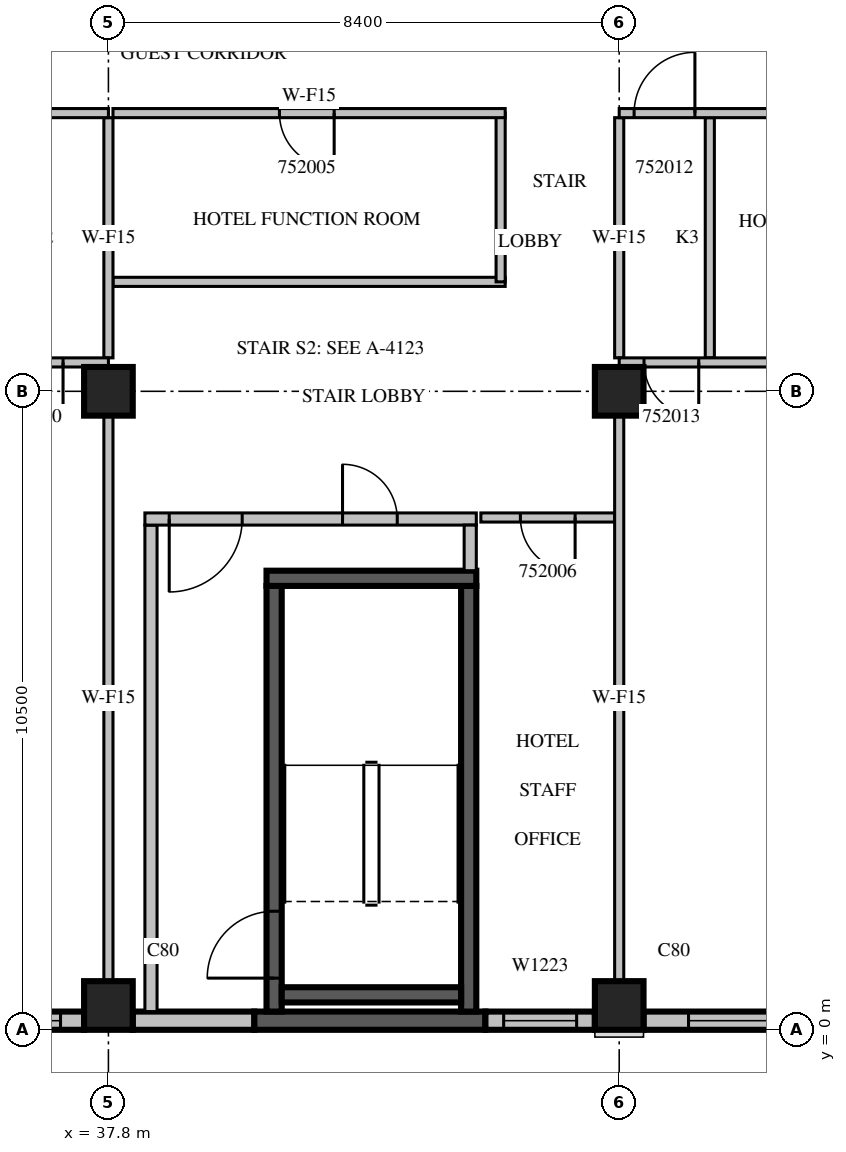
"""IFC4 building model, lengths in metres.
Left out: names, types, materials, properties, quantities, classifications, styles, units other than length and angle.
Written with IfcOpenShell. Run it as: python <this file> out.ifc"""

import sys

from ifc_helpers import new_model, si_unit, direction, frame, frame_2d, origin, origin_2d, place, context, subcontext, project, spatial, rectangle, extrude, source, transform, mapped, element, fill, save


model = new_model("IFC4")
c1 = context("Model", 3, precision=1e-05, world=origin(), true_north=direction((0.0, 1.0)))
c2 = subcontext(c1, "Body", "Model", "MODEL_VIEW")
j1 = project(units=[si_unit("LENGTHUNIT", "METRE"), si_unit("PLANEANGLEUNIT", "RADIAN")], contexts=[c1])
p1 = place(None, origin())
s1 = spatial("IfcSite", under=j1, at=p1, CompositionType="ELEMENT")
p2 = place(p1, origin())
s2 = spatial("IfcBuilding", under=s1, at=p2, CompositionType="ELEMENT")
p3 = place(p2, frame((0.0, 0.0, 231.0)))
s3 = spatial("IfcBuildingStorey", under=s2, at=p3, CompositionType="ELEMENT", Elevation=231.0)
m1 = source(origin(), c2, "Body", "SweptSolid", [
    extrude(rectangle(XDim=0.8, YDim=0.8, at=origin_2d()), origin(), (0.0, 0.0, 1.0), 3.8),
])
for number, where, z_axis, x_axis in (
    (1, (37.8, 0.4, 0.0), (0.0, 0.0, 1.0), (1.0, 0.0, 0.0)),
    (2, (46.2, 0.4, 0.0), (0.0, 0.0, 1.0), (1.0, 0.0, 0.0)),
    (3, (37.8, 10.5, 0.0), (0.0, 0.0, 1.0), (1.0, 0.0, 0.0)),
    (4, (46.2, 10.5, 0.0), (0.0, 0.0, 1.0), (1.0, 0.0, 0.0)),
):
    element("IfcColumn", number, at=place(p3, frame(where, z_axis=z_axis, x_axis=x_axis)), inside=s3, PredefinedType="COLUMN", context=c2, shape_type="MappedRepresentation", body=[
        mapped(m1, transform((0.0, 0.0, 0.0), scale=1.0)),
    ])
m2 = source(origin(), c2, "Body", "SweptSolid", [
    extrude(rectangle(XDim=7.6, YDim=0.3, at=frame_2d((3.8, 0.0))), origin(), (0.0, 0.0, 1.0), 3.4),
])
p4 = place(p3, frame((29.8, 0.15, 0.0), z_axis=(0.0, 0.0, 1.0), x_axis=(1.0, 0.0, 0.0)))
e5 = element("IfcWall", 5, at=p4, inside=s3, PredefinedType="STANDARD", context=c2, shape_type="MappedRepresentation", body=[
    mapped(m2, transform((0.0, 0.0, 0.0), scale=1.0)),
])
m3 = source(origin(), c2, "Body", "SweptSolid", [
    extrude(rectangle(XDim=1.2, YDim=2.3, at=frame_2d((0.6, 1.15))), frame((0.0, 0.16, 0.0), z_axis=(0.0, -1.0, 0.0), x_axis=(1.0, 0.0, 0.0)), (0.0, 0.0, 1.0), 0.32),
])
p5 = place(p4, frame((0.487, 0.0, 0.6)))
e6 = element("IfcOpeningElement", 6, at=p5, cuts=e5, PredefinedType="OPENING", context=c2, shape_type="MappedRepresentation", body=[
    mapped(m3, transform((0.0, 0.0, 0.0), scale=1.0)),
])
p6 = place(p4, frame((6.013, 0.0, 0.6)))
e7 = element("IfcOpeningElement", 7, at=p6, cuts=e5, PredefinedType="OPENING", context=c2, shape_type="MappedRepresentation", body=[
    mapped(m3, transform((0.0, 0.0, 0.0), scale=1.0)),
])
m4 = source(origin(), c2, "Body", "SweptSolid", [
    extrude(rectangle(XDim=2.4, YDim=2.3, at=frame_2d((1.2, 1.15))), frame((0.0, 0.16, 0.0), z_axis=(0.0, -1.0, 0.0), x_axis=(1.0, 0.0, 0.0)), (0.0, 0.0, 1.0), 0.32),
])
p7 = place(p4, frame((2.65, 0.0, 0.6)))
e8 = element("IfcOpeningElement", 8, at=p7, cuts=e5, PredefinedType="OPENING", context=c2, shape_type="MappedRepresentation", body=[
    mapped(m4, transform((0.0, 0.0, 0.0), scale=1.0)),
])
m5 = source(origin(), c2, "Body", "SweptSolid", [
    extrude(rectangle(XDim=2.0, YDim=0.3, at=frame_2d((1.0, 0.0))), origin(), (0.0, 0.0, 1.0), 3.4),
])
p8 = place(p3, frame((38.2, 0.15, 0.0), z_axis=(0.0, 0.0, 1.0), x_axis=(1.0, 0.0, 0.0)))
e9 = element("IfcWall", 9, at=p8, inside=s3, PredefinedType="STANDARD", context=c2, shape_type="MappedRepresentation", body=[
    mapped(m5, transform((0.0, 0.0, 0.0), scale=1.0)),
])
m6 = source(origin(), c2, "Body", "SweptSolid", [
    extrude(rectangle(XDim=3.8, YDim=0.3, at=frame_2d((1.9, 0.0))), origin(), (0.0, 0.0, 1.0), 3.4),
])
p9 = place(p3, frame((40.2, 0.15, 0.0), z_axis=(0.0, 0.0, 1.0), x_axis=(1.0, 0.0, 0.0)))
e10 = element("IfcWall", 10, at=p9, inside=s3, PredefinedType="SOLIDWALL", context=c2, shape_type="MappedRepresentation", body=[
    mapped(m6, transform((0.0, 0.0, 0.0), scale=1.0)),
])
m7 = source(origin(), c2, "Body", "SweptSolid", [
    extrude(rectangle(XDim=1.8, YDim=0.3, at=frame_2d((0.9, 0.0))), origin(), (0.0, 0.0, 1.0), 3.4),
])
p10 = place(p3, frame((44.0, 0.15, 0.0), z_axis=(0.0, 0.0, 1.0), x_axis=(1.0, 0.0, 0.0)))
e11 = element("IfcWall", 11, at=p10, inside=s3, PredefinedType="STANDARD", context=c2, shape_type="MappedRepresentation", body=[
    mapped(m7, transform((0.0, 0.0, 0.0), scale=1.0)),
])
p11 = place(p10, frame((0.3, 0.0, 0.6)))
e12 = element("IfcOpeningElement", 12, at=p11, cuts=e11, PredefinedType="OPENING", context=c2, shape_type="MappedRepresentation", body=[
    mapped(m3, transform((0.0, 0.0, 0.0), scale=1.0)),
])
m8 = source(origin(), c2, "Body", "SweptSolid", [
    extrude(rectangle(XDim=5.08, YDim=0.3, at=frame_2d((2.54, 0.0))), origin(), (0.0, 0.0, 1.0), 3.4),
])
p12 = place(p3, frame((46.6, 0.15, 0.0), z_axis=(0.0, 0.0, 1.0), x_axis=(1.0, 0.0, 0.0)))
e13 = element("IfcWall", 13, at=p12, inside=s3, PredefinedType="STANDARD", context=c2, shape_type="MappedRepresentation", body=[
    mapped(m8, transform((0.0, 0.0, 0.0), scale=1.0)),
])
m9 = source(origin(), c2, "Body", "SweptSolid", [
    extrude(rectangle(XDim=3.6, YDim=2.3, at=frame_2d((1.8, 1.15))), frame((0.0, 0.16, 0.0), z_axis=(0.0, -1.0, 0.0), x_axis=(1.0, 0.0, 0.0)), (0.0, 0.0, 1.0), 0.32),
])
p13 = place(p12, frame((0.74, 0.0, 0.6)))
e14 = element("IfcOpeningElement", 14, at=p13, cuts=e13, PredefinedType="OPENING", context=c2, shape_type="MappedRepresentation", body=[
    mapped(m9, transform((0.0, 0.0, 0.0), scale=1.0)),
])
m10 = source(origin(), c2, "Body", "SweptSolid", [
    extrude(rectangle(XDim=7.0, YDim=0.25, at=frame_2d((3.5, 0.0))), origin(), (0.0, 0.0, 1.0), 3.4),
])
p14 = place(p3, frame((40.525, 0.3, 0.0), z_axis=(0.0, 0.0, 1.0), x_axis=(0.0, 1.0, 0.0)))
e15 = element("IfcWall", 15, at=p14, inside=s3, PredefinedType="SOLIDWALL", context=c2, shape_type="MappedRepresentation", body=[
    mapped(m10, transform((0.0, 0.0, 0.0), scale=1.0)),
])
m11 = source(origin(), c2, "Body", "SweptSolid", [
    extrude(rectangle(XDim=1.1, YDim=2.1, at=frame_2d((0.55, 1.05))), frame((0.0, 0.135, 0.0), z_axis=(0.0, -1.0, 0.0), x_axis=(1.0, 0.0, 0.0)), (0.0, 0.0, 1.0), 0.27),
])
p15 = place(p14, frame((0.55, 0.0, 0.0)))
e16 = element("IfcOpeningElement", 16, at=p15, cuts=e15, PredefinedType="OPENING", context=c2, shape_type="MappedRepresentation", body=[
    mapped(m11, transform((0.0, 0.0, 0.0), scale=1.0)),
])
p16 = place(p3, frame((43.725, 0.3, 0.0), z_axis=(0.0, 0.0, 1.0), x_axis=(0.0, 1.0, 0.0)))
e17 = element("IfcWall", 17, at=p16, inside=s3, PredefinedType="SOLIDWALL", context=c2, shape_type="MappedRepresentation", body=[
    mapped(m10, transform((0.0, 0.0, 0.0), scale=1.0)),
])
m12 = source(origin(), c2, "Body", "SweptSolid", [
    extrude(rectangle(XDim=3.45, YDim=0.25, at=frame_2d((1.725, 0.0))), origin(), (0.0, 0.0, 1.0), 3.4),
])
p17 = place(p3, frame((40.4, 7.425, 0.0), z_axis=(0.0, 0.0, 1.0), x_axis=(1.0, 0.0, 0.0)))
e18 = element("IfcWall", 18, at=p17, inside=s3, PredefinedType="SOLIDWALL", context=c2, shape_type="MappedRepresentation", body=[
    mapped(m12, transform((0.0, 0.0, 0.0), scale=1.0)),
])
m13 = source(origin(), c2, "Body", "SweptSolid", [
    extrude(rectangle(XDim=2.95, YDim=0.25, at=frame_2d((1.475, 0.0))), origin(), (0.0, 0.0, 1.0), 3.4),
])
p18 = place(p3, frame((40.65, 0.575, 0.0), z_axis=(0.0, 0.0, 1.0), x_axis=(1.0, 0.0, 0.0)))
e19 = element("IfcWall", 19, at=p18, inside=s3, PredefinedType="SOLIDWALL", context=c2, shape_type="MappedRepresentation", body=[
    mapped(m13, transform((0.0, 0.0, 0.0), scale=1.0)),
])
m14 = source(origin(), c2, "Body", "SweptSolid", [
    extrude(rectangle(XDim=8.0, YDim=0.2, at=frame_2d((4.0, 0.0))), origin(), (0.0, 0.0, 1.0), 3.4),
])
p19 = place(p3, frame((38.5, 0.3, 0.0), z_axis=(0.0, 0.0, 1.0), x_axis=(0.0, 1.0, 0.0)))
e20 = element("IfcWall", 20, at=p19, inside=s3, PredefinedType="PARTITIONING", context=c2, shape_type="MappedRepresentation", body=[
    mapped(m14, transform((0.0, 0.0, 0.0), scale=1.0)),
])
m15 = source(origin(), c2, "Body", "SweptSolid", [
    extrude(rectangle(XDim=5.45, YDim=0.2, at=frame_2d((2.725, 0.0))), origin(), (0.0, 0.0, 1.0), 3.4),
])
p20 = place(p3, frame((38.4, 8.4, 0.0), z_axis=(0.0, 0.0, 1.0), x_axis=(1.0, 0.0, 0.0)))
e21 = element("IfcWall", 21, at=p20, inside=s3, PredefinedType="PARTITIONING", context=c2, shape_type="MappedRepresentation", body=[
    mapped(m15, transform((0.0, 0.0, 0.0), scale=1.0)),
])
m16 = source(origin(), c2, "Body", "SweptSolid", [
    extrude(rectangle(XDim=1.2, YDim=2.1, at=frame_2d((0.6, 1.05))), frame((0.0, 0.11, 0.0), z_axis=(0.0, -1.0, 0.0), x_axis=(1.0, 0.0, 0.0)), (0.0, 0.0, 1.0), 0.22),
])
p21 = place(p20, frame((0.4, 0.0, 0.0)))
e22 = element("IfcOpeningElement", 22, at=p21, cuts=e21, PredefinedType="OPENING", context=c2, shape_type="MappedRepresentation", body=[
    mapped(m16, transform((0.0, 0.0, 0.0), scale=1.0)),
])
m17 = source(origin(), c2, "Body", "SweptSolid", [
    extrude(rectangle(XDim=0.9, YDim=2.1, at=frame_2d((0.45, 1.05))), frame((0.0, 0.11, 0.0), z_axis=(0.0, -1.0, 0.0), x_axis=(1.0, 0.0, 0.0)), (0.0, 0.0, 1.0), 0.22),
])
p22 = place(p20, frame((3.25, 0.0, 0.0)))
e23 = element("IfcOpeningElement", 23, at=p22, cuts=e21, PredefinedType="OPENING", context=c2, shape_type="MappedRepresentation", body=[
    mapped(m17, transform((0.0, 0.0, 0.0), scale=1.0)),
])
m18 = source(origin(), c2, "Body", "SweptSolid", [
    extrude(rectangle(XDim=0.75, YDim=0.2, at=frame_2d((0.375, 0.0))), origin(), (0.0, 0.0, 1.0), 3.4),
])
p23 = place(p3, frame((43.75, 7.55, 0.0), z_axis=(0.0, 0.0, 1.0), x_axis=(0.0, 1.0, 0.0)))
e24 = element("IfcWall", 24, at=p23, inside=s3, PredefinedType="PARTITIONING", context=c2, shape_type="MappedRepresentation", body=[
    mapped(m18, transform((0.0, 0.0, 0.0), scale=1.0)),
])
m19 = source(origin(), c2, "Body", "SweptSolid", [
    extrude(rectangle(XDim=6.45, YDim=0.15, at=frame_2d((3.225, 0.0))), origin(), (0.0, 0.0, 1.0), 3.4),
])
p24 = place(p3, frame((37.875, 12.3, 0.0), z_axis=(0.0, 0.0, 1.0), x_axis=(1.0, 0.0, 0.0)))
e25 = element("IfcWall", 25, at=p24, inside=s3, PredefinedType="PARTITIONING", context=c2, shape_type="MappedRepresentation", body=[
    mapped(m19, transform((0.0, 0.0, 0.0), scale=1.0)),
])
m20 = source(origin(), c2, "Body", "SweptSolid", [
    extrude(rectangle(XDim=2.775, YDim=0.15, at=frame_2d((1.387, 0.0))), origin(), (0.0, 0.0, 1.0), 3.4),
])
p25 = place(p3, frame((44.25, 12.3, 0.0), z_axis=(0.0, 0.0, 1.0), x_axis=(0.0, 1.0, 0.0)))
e26 = element("IfcWall", 26, at=p25, inside=s3, PredefinedType="PARTITIONING", context=c2, shape_type="MappedRepresentation", body=[
    mapped(m20, transform((0.0, 0.0, 0.0), scale=1.0)),
])
p26 = place(p3, frame((44.325, 15.075, 0.0), z_axis=(0.0, 0.0, 1.0), x_axis=(-1.0, 0.0, 0.0)))
e27 = element("IfcWall", 27, at=p26, inside=s3, PredefinedType="PARTITIONING", context=c2, shape_type="MappedRepresentation", body=[
    mapped(m19, transform((0.0, 0.0, 0.0), scale=1.0)),
])
m21 = source(origin(), c2, "Body", "SweptSolid", [
    extrude(rectangle(XDim=0.9, YDim=2.1, at=frame_2d((0.45, 1.05))), frame((0.0, 0.085, 0.0), z_axis=(0.0, -1.0, 0.0), x_axis=(1.0, 0.0, 0.0)), (0.0, 0.0, 1.0), 0.17),
])
p27 = place(p26, frame((2.812, 0.0, 0.0)))
e28 = element("IfcOpeningElement", 28, at=p27, cuts=e27, PredefinedType="OPENING", context=c2, shape_type="MappedRepresentation", body=[
    mapped(m21, transform((0.0, 0.0, 0.0), scale=1.0)),
])
m22 = source(origin(), c2, "Body", "SweptSolid", [
    extrude(rectangle(XDim=2.2, YDim=0.15, at=frame_2d((1.1, 0.0))), origin(), (0.0, 0.0, 1.0), 3.4),
])
p28 = place(p3, frame((46.125, 8.425, 0.0), z_axis=(0.0, 0.0, 1.0), x_axis=(-1.0, 0.0, 0.0)))
e29 = element("IfcWall", 29, at=p28, inside=s3, PredefinedType="PARTITIONING", context=c2, shape_type="MappedRepresentation", body=[
    mapped(m22, transform((0.0, 0.0, 0.0), scale=1.0)),
])
p29 = place(p28, frame((0.65, 0.0, 0.0)))
e30 = element("IfcOpeningElement", 30, at=p29, cuts=e29, PredefinedType="OPENING", context=c2, shape_type="MappedRepresentation", body=[
    mapped(m21, transform((0.0, 0.0, 0.0), scale=1.0)),
])
m23 = source(origin(), c2, "Body", "SweptSolid", [
    extrude(rectangle(XDim=9.302, YDim=0.15, at=frame_2d((4.651, 0.0))), origin(), (0.0, 0.0, 1.0), 3.4),
])
p30 = place(p3, frame((37.8, 0.799, 0.0), z_axis=(0.0, 0.0, 1.0), x_axis=(0.0, 1.0, 0.0)))
e31 = element("IfcWall", 31, at=p30, inside=s3, PredefinedType="PARTITIONING", context=c2, shape_type="MappedRepresentation", body=[
    mapped(m23, transform((0.0, 0.0, 0.0), scale=1.0)),
])
m24 = source(origin(), c2, "Body", "SweptSolid", [
    extrude(rectangle(XDim=3.95, YDim=0.15, at=frame_2d((1.975, 0.0))), origin(), (0.0, 0.0, 1.0), 3.4),
])
p31 = place(p3, frame((37.8, 11.05, 0.0), z_axis=(0.0, 0.0, 1.0), x_axis=(0.0, 1.0, 0.0)))
e32 = element("IfcWall", 32, at=p31, inside=s3, PredefinedType="PARTITIONING", context=c2, shape_type="MappedRepresentation", body=[
    mapped(m24, transform((0.0, 0.0, 0.0), scale=1.0)),
])
m25 = source(origin(), c2, "Body", "SweptSolid", [
    extrude(rectangle(XDim=8.4, YDim=0.15, at=frame_2d((4.2, 0.0))), origin(), (0.0, 0.0, 1.0), 3.4),
])
p32 = place(p3, frame((37.8, 10.975, 0.0), z_axis=(0.0, 0.0, 1.0), x_axis=(-1.0, 0.0, 0.0)))
e33 = element("IfcWall", 33, at=p32, inside=s3, PredefinedType="PARTITIONING", context=c2, shape_type="MappedRepresentation", body=[
    mapped(m25, transform((0.0, 0.0, 0.0), scale=1.0)),
])
m26 = source(origin(), c2, "Body", "SweptSolid", [
    extrude(rectangle(XDim=1.6, YDim=2.1, at=frame_2d((0.8, 1.05))), frame((0.0, 0.085, 0.0), z_axis=(0.0, -1.0, 0.0), x_axis=(1.0, 0.0, 0.0)), (0.0, 0.0, 1.0), 0.17),
])
p33 = place(p32, frame((5.376, 0.0, 0.0)))
e34 = element("IfcOpeningElement", 34, at=p33, cuts=e33, PredefinedType="OPENING", context=c2, shape_type="MappedRepresentation", body=[
    mapped(m26, transform((0.0, 0.0, 0.0), scale=1.0)),
])
m27 = source(origin(), c2, "Body", "SweptSolid", [
    extrude(rectangle(XDim=1.0, YDim=2.1, at=frame_2d((0.5, 1.05))), frame((0.0, 0.085, 0.0), z_axis=(0.0, -1.0, 0.0), x_axis=(1.0, 0.0, 0.0)), (0.0, 0.0, 1.0), 0.17),
])
p34 = place(p32, frame((2.722, 0.0, 0.0)))
e35 = element("IfcOpeningElement", 35, at=p34, cuts=e33, PredefinedType="OPENING", context=c2, shape_type="MappedRepresentation", body=[
    mapped(m27, transform((0.0, 0.0, 0.0), scale=1.0)),
])
p35 = place(p32, frame((0.746, 0.0, 0.0)))
e36 = element("IfcOpeningElement", 36, at=p35, cuts=e33, PredefinedType="OPENING", context=c2, shape_type="MappedRepresentation", body=[
    mapped(m27, transform((0.0, 0.0, 0.0), scale=1.0)),
])
p36 = place(p3, frame((47.69, 11.05, 0.0), z_axis=(0.0, 0.0, 1.0), x_axis=(0.0, 1.0, 0.0)))
e37 = element("IfcWall", 37, at=p36, inside=s3, PredefinedType="PARTITIONING", context=c2, shape_type="MappedRepresentation", body=[
    mapped(m24, transform((0.0, 0.0, 0.0), scale=1.0)),
])
p37 = place(p3, frame((46.2, 0.799, 0.0), z_axis=(0.0, 0.0, 1.0), x_axis=(0.0, 1.0, 0.0)))
e38 = element("IfcWall", 38, at=p37, inside=s3, PredefinedType="PARTITIONING", context=c2, shape_type="MappedRepresentation", body=[
    mapped(m23, transform((0.0, 0.0, 0.0), scale=1.0)),
])
p38 = place(p3, frame((46.2, 11.05, 0.0), z_axis=(0.0, 0.0, 1.0), x_axis=(0.0, 1.0, 0.0)))
e39 = element("IfcWall", 39, at=p38, inside=s3, PredefinedType="PARTITIONING", context=c2, shape_type="MappedRepresentation", body=[
    mapped(m24, transform((0.0, 0.0, 0.0), scale=1.0)),
])
m28 = source(origin(), c2, "Body", "SweptSolid", [
    extrude(rectangle(XDim=7.355, YDim=0.15, at=frame_2d((3.678, 0.0))), origin(), (0.0, 0.0, 1.0), 3.4),
])
p39 = place(p3, frame((53.555, 10.975, 0.0), z_axis=(0.0, 0.0, 1.0), x_axis=(-1.0, 0.0, 0.0)))
e40 = element("IfcWall", 40, at=p39, inside=s3, PredefinedType="PARTITIONING", context=c2, shape_type="MappedRepresentation", body=[
    mapped(m28, transform((0.0, 0.0, 0.0), scale=1.0)),
])
p40 = place(p39, frame((6.047, 0.0, 0.0)))
e41 = element("IfcOpeningElement", 41, at=p40, cuts=e40, PredefinedType="OPENING", context=c2, shape_type="MappedRepresentation", body=[
    mapped(m21, transform((0.0, 0.0, 0.0), scale=1.0)),
])
p41 = place(p39, frame((3.39, 0.0, 0.0)))
e42 = element("IfcOpeningElement", 42, at=p41, cuts=e40, PredefinedType="OPENING", context=c2, shape_type="MappedRepresentation", body=[
    mapped(m21, transform((0.0, 0.0, 0.0), scale=1.0)),
])
p42 = place(p3, frame((37.8, 15.075, 0.0), z_axis=(0.0, 0.0, 1.0), x_axis=(-1.0, 0.0, 0.0)))
e43 = element("IfcWall", 43, at=p42, inside=s3, PredefinedType="PARTITIONING", context=c2, shape_type="MappedRepresentation", body=[
    mapped(m25, transform((0.0, 0.0, 0.0), scale=1.0)),
])
p43 = place(p42, frame((5.589, 0.0, 0.0)))
e44 = element("IfcOpeningElement", 44, at=p43, cuts=e43, PredefinedType="OPENING", context=c2, shape_type="MappedRepresentation", body=[
    mapped(m26, transform((0.0, 0.0, 0.0), scale=1.0)),
])
p44 = place(p42, frame((2.822, 0.0, 0.0)))
e45 = element("IfcOpeningElement", 45, at=p44, cuts=e43, PredefinedType="OPENING", context=c2, shape_type="MappedRepresentation", body=[
    mapped(m21, transform((0.0, 0.0, 0.0), scale=1.0)),
])
p45 = place(p3, frame((53.555, 15.075, 0.0), z_axis=(0.0, 0.0, 1.0), x_axis=(-1.0, 0.0, 0.0)))
e46 = element("IfcWall", 46, at=p45, inside=s3, PredefinedType="PARTITIONING", context=c2, shape_type="MappedRepresentation", body=[
    mapped(m28, transform((0.0, 0.0, 0.0), scale=1.0)),
])
p46 = place(p45, frame((6.11, 0.0, 0.0)))
e47 = element("IfcOpeningElement", 47, at=p46, cuts=e46, PredefinedType="OPENING", context=c2, shape_type="MappedRepresentation", body=[
    mapped(m27, transform((0.0, 0.0, 0.0), scale=1.0)),
])
m29 = source(origin(), c2, "Body", "SweptSolid", [
    extrude(rectangle(XDim=1.2, YDim=2.3, at=frame_2d((0.6, 1.15))), frame((0.0, 0.03, 0.0), z_axis=(0.0, -1.0, 0.0), x_axis=(1.0, 0.0, 0.0)), (0.0, 0.0, 1.0), 0.06),
])
p47 = place(p6, origin())
e48 = element("IfcWindow", 48, at=p47, inside=s3, PartitioningType="SINGLE_PANEL", PredefinedType="WINDOW", context=c2, shape_type="MappedRepresentation", body=[
    mapped(m29, transform((0.0, 0.0, 0.0), scale=1.0)),
])
fill(e7, e48)
p48 = place(p11, origin())
e49 = element("IfcWindow", 49, at=p48, inside=s3, PartitioningType="SINGLE_PANEL", PredefinedType="WINDOW", context=c2, shape_type="MappedRepresentation", body=[
    mapped(m29, transform((0.0, 0.0, 0.0), scale=1.0)),
])
fill(e12, e49)
m30 = source(origin(), c2, "Body", "SweptSolid", [
    extrude(rectangle(XDim=3.6, YDim=2.3, at=frame_2d((1.8, 1.15))), frame((0.0, 0.03, 0.0), z_axis=(0.0, -1.0, 0.0), x_axis=(1.0, 0.0, 0.0)), (0.0, 0.0, 1.0), 0.06),
])
p49 = place(p13, origin())
e50 = element("IfcWindow", 50, at=p49, inside=s3, PartitioningType="SINGLE_PANEL", PredefinedType="WINDOW", context=c2, shape_type="MappedRepresentation", body=[
    mapped(m30, transform((0.0, 0.0, 0.0), scale=1.0)),
])
fill(e14, e50)
m31 = source(origin(), c2, "Body", "SweptSolid", [
    extrude(rectangle(XDim=1.1, YDim=2.1, at=frame_2d((0.55, 1.05))), frame((0.0, 0.025, 0.0), z_axis=(0.0, -1.0, 0.0), x_axis=(1.0, 0.0, 0.0)), (0.0, 0.0, 1.0), 0.05),
])
p50 = place(p15, origin())
e51 = element("IfcDoor", 51, at=p50, inside=s3, OperationType="SINGLE_SWING_LEFT", PredefinedType="DOOR", context=c2, shape_type="MappedRepresentation", body=[
    mapped(m31, transform((0.0, 0.0, 0.0), scale=1.0)),
])
fill(e16, e51)
m32 = source(origin(), c2, "Body", "SweptSolid", [
    extrude(rectangle(XDim=1.2, YDim=2.1, at=frame_2d((0.6, 1.05))), frame((0.0, 0.025, 0.0), z_axis=(0.0, -1.0, 0.0), x_axis=(1.0, 0.0, 0.0)), (0.0, 0.0, 1.0), 0.05),
])
p51 = place(p21, origin())
e52 = element("IfcDoor", 52, at=p51, inside=s3, OperationType="SINGLE_SWING_RIGHT", PredefinedType="DOOR", context=c2, shape_type="MappedRepresentation", body=[
    mapped(m32, transform((0.0, 0.0, 0.0), scale=1.0)),
])
fill(e22, e52)
m33 = source(origin(), c2, "Body", "SweptSolid", [
    extrude(rectangle(XDim=0.9, YDim=2.1, at=frame_2d((0.45, 1.05))), frame((0.0, 0.025, 0.0), z_axis=(0.0, -1.0, 0.0), x_axis=(1.0, 0.0, 0.0)), (0.0, 0.0, 1.0), 0.05),
])
p52 = place(p22, origin())
e53 = element("IfcDoor", 53, at=p52, inside=s3, OperationType="SINGLE_SWING_LEFT", PredefinedType="DOOR", context=c2, shape_type="MappedRepresentation", body=[
    mapped(m33, transform((0.0, 0.0, 0.0), scale=1.0)),
])
fill(e23, e53)
p53 = place(p27, origin())
e54 = element("IfcDoor", 54, at=p53, inside=s3, OperationType="SINGLE_SWING_LEFT", PredefinedType="DOOR", context=c2, shape_type="MappedRepresentation", body=[
    mapped(m33, transform((0.0, 0.0, 0.0), scale=1.0)),
])
fill(e28, e54)
p54 = place(p29, origin())
e55 = element("IfcDoor", 55, at=p54, inside=s3, OperationType="SINGLE_SWING_LEFT", PredefinedType="DOOR", context=c2, shape_type="MappedRepresentation", body=[
    mapped(m33, transform((0.0, 0.0, 0.0), scale=1.0)),
])
fill(e30, e55)
m34 = source(origin(), c2, "Body", "SweptSolid", [
    extrude(rectangle(XDim=1.0, YDim=2.1, at=frame_2d((0.5, 1.05))), frame((0.0, 0.025, 0.0), z_axis=(0.0, -1.0, 0.0), x_axis=(1.0, 0.0, 0.0)), (0.0, 0.0, 1.0), 0.05),
])
p55 = place(p35, origin())
e56 = element("IfcDoor", 56, at=p55, inside=s3, OperationType="SINGLE_SWING_LEFT", PredefinedType="DOOR", context=c2, shape_type="MappedRepresentation", body=[
    mapped(m34, transform((0.0, 0.0, 0.0), scale=1.0)),
])
fill(e36, e56)
p56 = place(p46, origin())
e57 = element("IfcDoor", 57, at=p56, inside=s3, OperationType="SINGLE_SWING_RIGHT", PredefinedType="DOOR", context=c2, shape_type="MappedRepresentation", body=[
    mapped(m34, transform((0.0, 0.0, 0.0), scale=1.0)),
])
fill(e47, e57)
p57 = place(p40, origin())
e58 = element("IfcDoor", 58, at=p57, inside=s3, OperationType="SINGLE_SWING_LEFT", PredefinedType="DOOR", context=c2, shape_type="MappedRepresentation", body=[
    mapped(m33, transform((0.0, 0.0, 0.0), scale=1.0)),
])
fill(e41, e58)
save(model, sys.argv[1])
